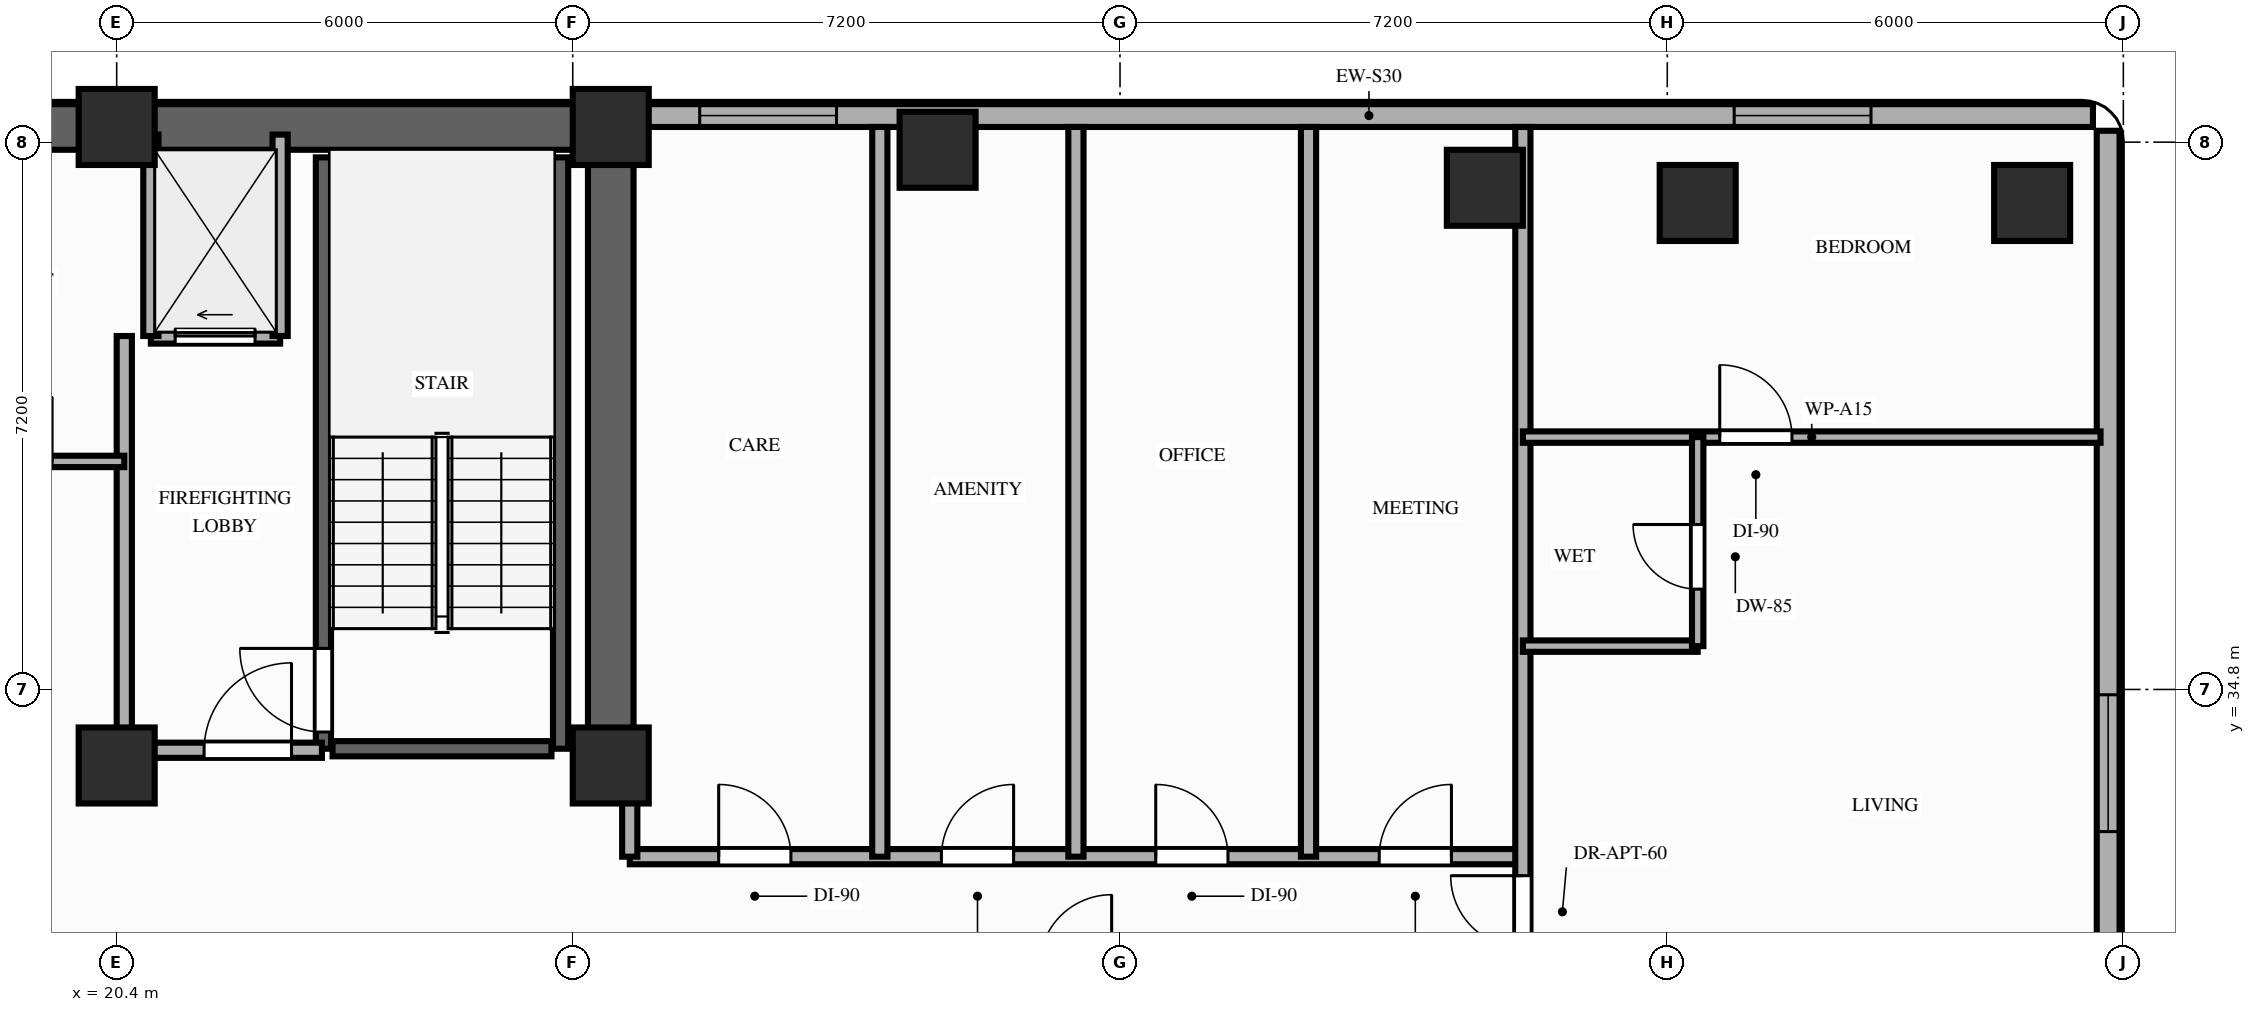
"""IFC4 building model, lengths in metres.
Left out: names, types, materials, properties, quantities, classifications, styles, units other than length and angle.
Written with IfcOpenShell. Run it as: python <this file> out.ifc"""

import sys

from ifc_helpers import new_model, si_unit, direction, frame, frame_2d, origin, origin_2d, place, context, subcontext, project, spatial, rectangle, extrude, element, fill, save


model = new_model("IFC4")
c1 = context("Model", 3, precision=1e-05, world=origin(), true_north=direction((0.0, 1.0)))
c2 = subcontext(c1, "Body", "Model", "MODEL_VIEW")
j1 = project(units=[si_unit("LENGTHUNIT", "METRE"), si_unit("PLANEANGLEUNIT", "RADIAN")], contexts=[c1])
p1 = place(None, origin())
s1 = spatial("IfcSite", under=j1, at=p1, CompositionType="ELEMENT")
p2 = place(p1, origin())
s2 = spatial("IfcBuilding", under=s1, at=p2, CompositionType="ELEMENT")
p3 = place(p2, frame((0.0, 0.0, 133.0)))
s3 = spatial("IfcBuildingStorey", under=s2, at=p3, CompositionType="ELEMENT", Elevation=133.0)
for number, where, z_axis, x_axis in (
    (1, (20.4, 33.8, 0.0), (0.0, 0.0, 1.0), (1.0, 0.0, 0.0)),
    (2, (26.9, 33.8, 0.0), (0.0, 0.0, 1.0), (1.0, 0.0, 0.0)),
    (3, (20.4, 42.2, 0.0), (0.0, 0.0, 1.0), (1.0, 0.0, 0.0)),
    (4, (26.9, 42.2, 0.0), (0.0, 0.0, 1.0), (1.0, 0.0, 0.0)),
    (5, (31.2, 41.9, 0.0), (0.0, 0.0, 1.0), (1.0, 0.0, 0.0)),
    (6, (38.4, 41.4, 0.0), (0.0, 0.0, 1.0), (1.0, 0.0, 0.0)),
    (7, (41.2, 41.2, 0.0), (0.0, 0.0, 1.0), (1.0, 0.0, 0.0)),
    (8, (45.6, 41.2, 0.0), (0.0, 0.0, 1.0), (1.0, 0.0, 0.0)),
):
    element("IfcColumn", number, at=place(p3, frame(where, z_axis=z_axis, x_axis=x_axis)), inside=s3, PredefinedType="COLUMN", context=c2, shape_type="SweptSolid", body=[
        extrude(rectangle(XDim=1.0, YDim=1.0, at=origin_2d()), origin(), (0.0, 0.0, 1.0), 3.2),
    ])
p4 = place(p3, frame((46.4, 42.35, 0.0), z_axis=(0.0, 0.0, 1.0), x_axis=(-1.0, 0.0, 0.0)))
e9 = element("IfcWall", 9, at=p4, inside=s3, PredefinedType="STANDARD", context=c2, shape_type="SweptSolid", body=[
    extrude(rectangle(XDim=19.05, YDim=0.3, at=frame_2d((9.525, 0.0))), origin(), (0.0, 0.0, 1.0), 2.46),
])
p5 = place(p4, frame((2.92, 0.0, 0.85)))
e10 = element("IfcOpeningElement", 10, at=p5, cuts=e9, PredefinedType="OPENING", context=c2, shape_type="SweptSolid", body=[
    extrude(rectangle(XDim=1.8, YDim=1.36, at=frame_2d((0.9, 0.68))), frame((0.0, 0.16, 0.0), z_axis=(0.0, -1.0, 0.0), x_axis=(1.0, 0.0, 0.0)), (0.0, 0.0, 1.0), 0.32),
])
p6 = place(p4, frame((16.53, 0.0, 0.85)))
e11 = element("IfcOpeningElement", 11, at=p6, cuts=e9, PredefinedType="OPENING", context=c2, shape_type="SweptSolid", body=[
    extrude(rectangle(XDim=1.8, YDim=1.36, at=frame_2d((0.9, 0.68))), frame((0.0, 0.16, 0.0), z_axis=(0.0, -1.0, 0.0), x_axis=(1.0, 0.0, 0.0)), (0.0, 0.0, 1.0), 0.32),
])
p7 = place(p3, frame((46.6, 26.8, 0.0), z_axis=(0.0, 0.0, 1.0), x_axis=(0.0, 1.0, 0.0)))
e12 = element("IfcWall", 12, at=p7, inside=s3, PredefinedType="STANDARD", context=c2, shape_type="SweptSolid", body=[
    extrude(rectangle(XDim=15.35, YDim=0.3, at=frame_2d((7.675, 0.0))), origin(), (0.0, 0.0, 1.0), 3.02),
])
p8 = place(p7, frame((6.13, 0.0, 0.85)))
e13 = element("IfcOpeningElement", 13, at=p8, cuts=e12, PredefinedType="OPENING", context=c2, shape_type="SweptSolid", body=[
    extrude(rectangle(XDim=1.8, YDim=1.75, at=frame_2d((0.9, 0.875))), frame((0.0, 0.16, 0.0), z_axis=(0.0, -1.0, 0.0), x_axis=(1.0, 0.0, 0.0)), (0.0, 0.0, 1.0), 0.32),
])
p9 = place(p3, frame((6.45, 42.2, 0.0), z_axis=(0.0, 0.0, 1.0), x_axis=(1.0, 0.0, 0.0)))
e14 = element("IfcWall", 14, at=p9, inside=s3, PredefinedType="SHEAR", context=c2, shape_type="SweptSolid", body=[
    extrude(rectangle(XDim=20.45, YDim=0.6, at=frame_2d((10.225, 0.0))), origin(), (0.0, 0.0, 1.0), 3.02),
])
p10 = place(p3, frame((26.9, 33.8, 0.0), z_axis=(0.0, 0.0, 1.0), x_axis=(0.0, 1.0, 0.0)))
e15 = element("IfcWall", 15, at=p10, inside=s3, PredefinedType="SHEAR", context=c2, shape_type="SweptSolid", body=[
    extrude(rectangle(XDim=7.95, YDim=0.6, at=frame_2d((3.975, 0.0))), origin(), (0.0, 0.0, 1.0), 3.02),
])
p11 = place(p3, frame((23.12, 34.02, 0.0), z_axis=(0.0, 0.0, 1.0), x_axis=(0.0, 1.0, 0.0)))
e16 = element("IfcWall", 16, at=p11, inside=s3, PredefinedType="SHEAR", context=c2, shape_type="SweptSolid", body=[
    extrude(rectangle(XDim=7.78, YDim=0.2, at=frame_2d((3.89, 0.0))), origin(), (0.0, 0.0, 1.0), 3.02),
])
p12 = place(p11, frame((0.22, 0.0, 0.0)))
e17 = element("IfcOpeningElement", 17, at=p12, cuts=e16, PredefinedType="OPENING", context=c2, shape_type="SweptSolid", body=[
    extrude(rectangle(XDim=1.1, YDim=2.15, at=frame_2d((0.55, 1.075))), frame((0.0, 0.11, 0.0), z_axis=(0.0, -1.0, 0.0), x_axis=(1.0, 0.0, 0.0)), (0.0, 0.0, 1.0), 0.22),
])
p13 = place(p3, frame((26.24, 34.02, 0.0), z_axis=(0.0, 0.0, 1.0), x_axis=(0.0, 1.0, 0.0)))
e18 = element("IfcWall", 18, at=p13, inside=s3, PredefinedType="SHEAR", context=c2, shape_type="SweptSolid", body=[
    extrude(rectangle(XDim=7.78, YDim=0.2, at=frame_2d((3.89, 0.0))), origin(), (0.0, 0.0, 1.0), 3.02),
])
p14 = place(p3, frame((23.24, 34.02, 0.0), z_axis=(0.0, 0.0, 1.0), x_axis=(1.0, 0.0, 0.0)))
e19 = element("IfcWall", 19, at=p14, inside=s3, PredefinedType="SHEAR", context=c2, shape_type="SweptSolid", body=[
    extrude(rectangle(XDim=2.88, YDim=0.2, at=frame_2d((1.44, 0.0))), origin(), (0.0, 0.0, 1.0), 3.02),
])
p15 = place(p3, frame((20.85, 39.45, 0.0), z_axis=(0.0, 0.0, 1.0), x_axis=(1.0, 0.0, 0.0)))
e20 = element("IfcWall", 20, at=p15, inside=s3, PredefinedType="MOVABLE", context=c2, shape_type="SweptSolid", body=[
    extrude(rectangle(XDim=1.7, YDim=0.2, at=frame_2d((0.85, 0.0))), origin(), (0.0, 0.0, 1.0), 3.02),
])
p16 = place(p15, frame((0.32, 0.0, 0.0)))
e21 = element("IfcOpeningElement", 21, at=p16, cuts=e20, PredefinedType="OPENING", context=c2, shape_type="SweptSolid", body=[
    extrude(rectangle(XDim=1.05, YDim=2.15, at=frame_2d((0.525, 1.075))), frame((0.0, 0.11, 0.0), z_axis=(0.0, -1.0, 0.0), x_axis=(1.0, 0.0, 0.0)), (0.0, 0.0, 1.0), 0.22),
])
for number, where, z_axis, x_axis in (
    (22, (20.85, 39.45, 0.0), (0.0, 0.0, 1.0), (0.0, 1.0, 0.0)),
    (23, (22.55, 39.45, 0.0), (0.0, 0.0, 1.0), (0.0, 1.0, 0.0)),
):
    element("IfcWall", number, at=place(p3, frame(where, z_axis=z_axis, x_axis=x_axis)), inside=s3, PredefinedType="MOVABLE", context=c2, shape_type="SweptSolid", body=[
        extrude(rectangle(XDim=2.65, YDim=0.2, at=frame_2d((1.325, 0.0))), origin(), (0.0, 0.0, 1.0), 2.46),
    ])
p17 = place(p3, frame((20.5, 34.0, 0.0), z_axis=(0.0, 0.0, 1.0), x_axis=(0.0, 1.0, 0.0)))
e24 = element("IfcWall", 24, at=p17, inside=s3, PredefinedType="PARTITIONING", context=c2, shape_type="SweptSolid", body=[
    extrude(rectangle(XDim=5.45, YDim=0.2, at=frame_2d((2.725, 0.0))), origin(), (0.0, 0.0, 1.0), 2.46),
])
p18 = place(p3, frame((20.5, 34.0, 0.0), z_axis=(0.0, 0.0, 1.0), x_axis=(1.0, 0.0, 0.0)))
e25 = element("IfcWall", 25, at=p18, inside=s3, PredefinedType="PARTITIONING", context=c2, shape_type="SweptSolid", body=[
    extrude(rectangle(XDim=2.6, YDim=0.2, at=frame_2d((1.3, 0.0))), origin(), (0.0, 0.0, 1.0), 2.46),
])
p19 = place(p18, frame((1.05, 0.0, 0.0)))
e26 = element("IfcOpeningElement", 26, at=p19, cuts=e25, PredefinedType="OPENING", context=c2, shape_type="SweptSolid", body=[
    extrude(rectangle(XDim=1.15, YDim=2.15, at=frame_2d((0.575, 1.075))), frame((0.0, 0.11, 0.0), z_axis=(0.0, -1.0, 0.0), x_axis=(1.0, 0.0, 0.0)), (0.0, 0.0, 1.0), 0.22),
])
p20 = place(p3, frame((12.9, 37.8, 0.0), z_axis=(0.0, 0.0, 1.0), x_axis=(1.0, 0.0, 0.0)))
e27 = element("IfcWall", 27, at=p20, inside=s3, PredefinedType="PARTITIONING", context=c2, shape_type="SweptSolid", body=[
    extrude(rectangle(XDim=7.6, YDim=0.15, at=frame_2d((3.8, 0.0))), origin(), (0.0, 0.0, 1.0), 3.02),
])
p21 = place(p20, frame((0.7, 0.0, 0.0)))
e28 = element("IfcOpeningElement", 28, at=p21, cuts=e27, PredefinedType="OPENING", context=c2, shape_type="SweptSolid", body=[
    extrude(rectangle(XDim=0.85, YDim=2.05, at=frame_2d((0.425, 1.025))), frame((0.0, 0.085, 0.0), z_axis=(0.0, -1.0, 0.0), x_axis=(1.0, 0.0, 0.0)), (0.0, 0.0, 1.0), 0.17),
])
p22 = place(p20, frame((3.25, 0.0, 0.0)))
e29 = element("IfcOpeningElement", 29, at=p22, cuts=e27, PredefinedType="OPENING", context=c2, shape_type="SweptSolid", body=[
    extrude(rectangle(XDim=0.85, YDim=2.05, at=frame_2d((0.425, 1.025))), frame((0.0, 0.085, 0.0), z_axis=(0.0, -1.0, 0.0), x_axis=(1.0, 0.0, 0.0)), (0.0, 0.0, 1.0), 0.17),
])
p23 = place(p20, frame((5.8, 0.0, 0.0)))
e30 = element("IfcOpeningElement", 30, at=p23, cuts=e27, PredefinedType="OPENING", context=c2, shape_type="SweptSolid", body=[
    extrude(rectangle(XDim=0.85, YDim=2.05, at=frame_2d((0.425, 1.025))), frame((0.0, 0.085, 0.0), z_axis=(0.0, -1.0, 0.0), x_axis=(1.0, 0.0, 0.0)), (0.0, 0.0, 1.0), 0.17),
])
p24 = place(p3, frame((27.15, 32.6, 0.0), z_axis=(0.0, 0.0, 1.0), x_axis=(1.0, 0.0, 0.0)))
e31 = element("IfcWall", 31, at=p24, inside=s3, PredefinedType="PARTITIONING", context=c2, shape_type="SweptSolid", body=[
    extrude(rectangle(XDim=11.75, YDim=0.2, at=frame_2d((5.875, 0.0))), origin(), (0.0, 0.0, 1.0), 2.46),
])
p25 = place(p24, frame((1.17, 0.0, 0.0)))
e32 = element("IfcOpeningElement", 32, at=p25, cuts=e31, PredefinedType="OPENING", context=c2, shape_type="SweptSolid", body=[
    extrude(rectangle(XDim=0.95, YDim=2.15, at=frame_2d((0.475, 1.075))), frame((0.0, 0.11, 0.0), z_axis=(0.0, -1.0, 0.0), x_axis=(1.0, 0.0, 0.0)), (0.0, 0.0, 1.0), 0.22),
])
p26 = place(p24, frame((4.1, 0.0, 0.0)))
e33 = element("IfcOpeningElement", 33, at=p26, cuts=e31, PredefinedType="OPENING", context=c2, shape_type="SweptSolid", body=[
    extrude(rectangle(XDim=0.95, YDim=2.15, at=frame_2d((0.475, 1.075))), frame((0.0, 0.11, 0.0), z_axis=(0.0, -1.0, 0.0), x_axis=(1.0, 0.0, 0.0)), (0.0, 0.0, 1.0), 0.22),
])
p27 = place(p24, frame((6.92, 0.0, 0.0)))
e34 = element("IfcOpeningElement", 34, at=p27, cuts=e31, PredefinedType="OPENING", context=c2, shape_type="SweptSolid", body=[
    extrude(rectangle(XDim=0.95, YDim=2.15, at=frame_2d((0.475, 1.075))), frame((0.0, 0.11, 0.0), z_axis=(0.0, -1.0, 0.0), x_axis=(1.0, 0.0, 0.0)), (0.0, 0.0, 1.0), 0.22),
])
p28 = place(p24, frame((9.86, 0.0, 0.0)))
e35 = element("IfcOpeningElement", 35, at=p28, cuts=e31, PredefinedType="OPENING", context=c2, shape_type="SweptSolid", body=[
    extrude(rectangle(XDim=0.95, YDim=2.15, at=frame_2d((0.475, 1.075))), frame((0.0, 0.11, 0.0), z_axis=(0.0, -1.0, 0.0), x_axis=(1.0, 0.0, 0.0)), (0.0, 0.0, 1.0), 0.22),
])
p29 = place(p3, frame((27.15, 32.6, 0.0), z_axis=(0.0, 0.0, 1.0), x_axis=(0.0, 1.0, 0.0)))
e36 = element("IfcWall", 36, at=p29, inside=s3, PredefinedType="PARTITIONING", context=c2, shape_type="SweptSolid", body=[
    extrude(rectangle(XDim=1.08, YDim=0.2, at=frame_2d((0.54, 0.0))), origin(), (0.0, 0.0, 1.0), 2.46),
])
p30 = place(p3, frame((38.9, 26.75, 0.0), z_axis=(0.0, 0.0, 1.0), x_axis=(0.0, 1.0, 0.0)))
e37 = element("IfcWall", 37, at=p30, inside=s3, PredefinedType="PARTITIONING", context=c2, shape_type="SweptSolid", body=[
    extrude(rectangle(XDim=15.45, YDim=0.2, at=frame_2d((7.725, 0.0))), origin(), (0.0, 0.0, 1.0), 2.46),
])
p31 = place(p30, frame((4.65, 0.0, 0.0)))
e38 = element("IfcOpeningElement", 38, at=p31, cuts=e37, PredefinedType="OPENING", context=c2, shape_type="SweptSolid", body=[
    extrude(rectangle(XDim=0.95, YDim=2.15, at=frame_2d((0.475, 1.075))), frame((0.0, 0.11, 0.0), z_axis=(0.0, -1.0, 0.0), x_axis=(1.0, 0.0, 0.0)), (0.0, 0.0, 1.0), 0.22),
])
p32 = place(p3, frame((38.9, 38.12, 0.0), z_axis=(0.0, 0.0, 1.0), x_axis=(1.0, 0.0, 0.0)))
e39 = element("IfcWall", 39, at=p32, inside=s3, PredefinedType="PARTITIONING", context=c2, shape_type="SweptSolid", body=[
    extrude(rectangle(XDim=7.6, YDim=0.15, at=frame_2d((3.8, 0.0))), origin(), (0.0, 0.0, 1.0), 2.46),
])
p33 = place(p32, frame((2.59, 0.0, 0.0)))
e40 = element("IfcOpeningElement", 40, at=p33, cuts=e39, PredefinedType="OPENING", context=c2, shape_type="SweptSolid", body=[
    extrude(rectangle(XDim=0.95, YDim=2.15, at=frame_2d((0.475, 1.075))), frame((0.0, 0.085, 0.0), z_axis=(0.0, -1.0, 0.0), x_axis=(1.0, 0.0, 0.0)), (0.0, 0.0, 1.0), 0.17),
])
p34 = place(p3, frame((38.9, 35.37, 0.0), z_axis=(0.0, 0.0, 1.0), x_axis=(1.0, 0.0, 0.0)))
e41 = element("IfcWall", 41, at=p34, inside=s3, PredefinedType="PARTITIONING", context=c2, shape_type="SweptSolid", body=[
    extrude(rectangle(XDim=2.3, YDim=0.15, at=frame_2d((1.15, 0.0))), origin(), (0.0, 0.0, 1.0), 2.46),
])
p35 = place(p3, frame((41.2, 35.37, 0.0), z_axis=(0.0, 0.0, 1.0), x_axis=(0.0, 1.0, 0.0)))
e42 = element("IfcWall", 42, at=p35, inside=s3, PredefinedType="PARTITIONING", context=c2, shape_type="SweptSolid", body=[
    extrude(rectangle(XDim=2.75, YDim=0.15, at=frame_2d((1.375, 0.0))), origin(), (0.0, 0.0, 1.0), 2.46),
])
p36 = place(p35, frame((0.75, 0.0, 0.0)))
e43 = element("IfcOpeningElement", 43, at=p36, cuts=e42, PredefinedType="OPENING", context=c2, shape_type="SweptSolid", body=[
    extrude(rectangle(XDim=0.85, YDim=2.1, at=frame_2d((0.425, 1.05))), frame((0.0, 0.085, 0.0), z_axis=(0.0, -1.0, 0.0), x_axis=(1.0, 0.0, 0.0)), (0.0, 0.0, 1.0), 0.17),
])
for number, where, z_axis, x_axis in (
    (44, (30.44, 32.6, 0.0), (0.0, 0.0, 1.0), (0.0, 1.0, 0.0)),
    (45, (33.02, 32.6, 0.0), (0.0, 0.0, 1.0), (0.0, 1.0, 0.0)),
    (46, (36.08, 32.6, 0.0), (0.0, 0.0, 1.0), (0.0, 1.0, 0.0)),
):
    element("IfcWall", number, at=place(p3, frame(where, z_axis=z_axis, x_axis=x_axis)), inside=s3, PredefinedType="PARTITIONING", context=c2, shape_type="SweptSolid", body=[
        extrude(rectangle(XDim=9.6, YDim=0.2, at=frame_2d((4.8, 0.0))), origin(), (0.0, 0.0, 1.0), 2.46),
    ])
p37 = place(p8, origin())
e47 = element("IfcWindow", 47, at=p37, inside=s3, PartitioningType="SINGLE_PANEL", PredefinedType="WINDOW", context=c2, shape_type="SweptSolid", body=[
    extrude(rectangle(XDim=1.8, YDim=1.75, at=frame_2d((0.9, 0.875))), frame((0.0, 0.03, 0.0), z_axis=(0.0, -1.0, 0.0), x_axis=(1.0, 0.0, 0.0)), (0.0, 0.0, 1.0), 0.06),
])
fill(e13, e47)
p38 = place(p5, origin())
e48 = element("IfcWindow", 48, at=p38, inside=s3, PartitioningType="SINGLE_PANEL", PredefinedType="WINDOW", context=c2, shape_type="SweptSolid", body=[
    extrude(rectangle(XDim=1.8, YDim=1.36, at=frame_2d((0.9, 0.68))), frame((0.0, 0.03, 0.0), z_axis=(0.0, -1.0, 0.0), x_axis=(1.0, 0.0, 0.0)), (0.0, 0.0, 1.0), 0.06),
])
fill(e10, e48)
p39 = place(p6, origin())
e49 = element("IfcWindow", 49, at=p39, inside=s3, PartitioningType="SINGLE_PANEL", PredefinedType="WINDOW", context=c2, shape_type="SweptSolid", body=[
    extrude(rectangle(XDim=1.8, YDim=1.36, at=frame_2d((0.9, 0.68))), frame((0.0, 0.03, 0.0), z_axis=(0.0, -1.0, 0.0), x_axis=(1.0, 0.0, 0.0)), (0.0, 0.0, 1.0), 0.06),
])
fill(e11, e49)
p40 = place(p12, origin())
e50 = element("IfcDoor", 50, at=p40, inside=s3, OperationType="SINGLE_SWING_RIGHT", PredefinedType="DOOR", context=c2, shape_type="SweptSolid", body=[
    extrude(rectangle(XDim=1.1, YDim=2.15, at=frame_2d((0.55, 1.075))), frame((0.0, 0.025, 0.0), z_axis=(0.0, -1.0, 0.0), x_axis=(1.0, 0.0, 0.0)), (0.0, 0.0, 1.0), 0.05),
])
fill(e17, e50)
p41 = place(p16, origin())
e51 = element("IfcDoor", 51, at=p41, inside=s3, OperationType="SLIDING_TO_LEFT", PredefinedType="DOOR", context=c2, shape_type="SweptSolid", body=[
    extrude(rectangle(XDim=1.05, YDim=2.15, at=frame_2d((0.525, 1.075))), frame((0.0, 0.025, 0.0), z_axis=(0.0, -1.0, 0.0), x_axis=(1.0, 0.0, 0.0)), (0.0, 0.0, 1.0), 0.05),
])
fill(e21, e51)
p42 = place(p19, origin())
e52 = element("IfcDoor", 52, at=p42, inside=s3, OperationType="SINGLE_SWING_RIGHT", PredefinedType="DOOR", context=c2, shape_type="SweptSolid", body=[
    extrude(rectangle(XDim=1.15, YDim=2.15, at=frame_2d((0.575, 1.075))), frame((0.0, 0.025, 0.0), z_axis=(0.0, -1.0, 0.0), x_axis=(1.0, 0.0, 0.0)), (0.0, 0.0, 1.0), 0.05),
])
fill(e26, e52)
p43 = place(p31, origin())
e53 = element("IfcDoor", 53, at=p43, inside=s3, OperationType="SINGLE_SWING_RIGHT", PredefinedType="DOOR", context=c2, shape_type="SweptSolid", body=[
    extrude(rectangle(XDim=0.95, YDim=2.15, at=frame_2d((0.475, 1.075))), frame((0.0, 0.025, 0.0), z_axis=(0.0, -1.0, 0.0), x_axis=(1.0, 0.0, 0.0)), (0.0, 0.0, 1.0), 0.05),
])
fill(e38, e53)
p44 = place(p33, origin())
e54 = element("IfcDoor", 54, at=p44, inside=s3, OperationType="SINGLE_SWING_LEFT", PredefinedType="DOOR", context=c2, shape_type="SweptSolid", body=[
    extrude(rectangle(XDim=0.95, YDim=2.15, at=frame_2d((0.475, 1.075))), frame((0.0, 0.025, 0.0), z_axis=(0.0, -1.0, 0.0), x_axis=(1.0, 0.0, 0.0)), (0.0, 0.0, 1.0), 0.05),
])
fill(e40, e54)
p45 = place(p36, origin())
e55 = element("IfcDoor", 55, at=p45, inside=s3, OperationType="SINGLE_SWING_RIGHT", PredefinedType="DOOR", context=c2, shape_type="SweptSolid", body=[
    extrude(rectangle(XDim=0.85, YDim=2.1, at=frame_2d((0.425, 1.05))), frame((0.0, 0.025, 0.0), z_axis=(0.0, -1.0, 0.0), x_axis=(1.0, 0.0, 0.0)), (0.0, 0.0, 1.0), 0.05),
])
fill(e43, e55)
p46 = place(p25, origin())
e56 = element("IfcDoor", 56, at=p46, inside=s3, OperationType="SINGLE_SWING_LEFT", PredefinedType="DOOR", context=c2, shape_type="SweptSolid", body=[
    extrude(rectangle(XDim=0.95, YDim=2.15, at=frame_2d((0.475, 1.075))), frame((0.0, 0.025, 0.0), z_axis=(0.0, -1.0, 0.0), x_axis=(1.0, 0.0, 0.0)), (0.0, 0.0, 1.0), 0.05),
])
fill(e32, e56)
p47 = place(p26, origin())
e57 = element("IfcDoor", 57, at=p47, inside=s3, OperationType="SINGLE_SWING_RIGHT", PredefinedType="DOOR", context=c2, shape_type="SweptSolid", body=[
    extrude(rectangle(XDim=0.95, YDim=2.15, at=frame_2d((0.475, 1.075))), frame((0.0, 0.025, 0.0), z_axis=(0.0, -1.0, 0.0), x_axis=(1.0, 0.0, 0.0)), (0.0, 0.0, 1.0), 0.05),
])
fill(e33, e57)
p48 = place(p27, origin())
e58 = element("IfcDoor", 58, at=p48, inside=s3, OperationType="SINGLE_SWING_LEFT", PredefinedType="DOOR", context=c2, shape_type="SweptSolid", body=[
    extrude(rectangle(XDim=0.95, YDim=2.15, at=frame_2d((0.475, 1.075))), frame((0.0, 0.025, 0.0), z_axis=(0.0, -1.0, 0.0), x_axis=(1.0, 0.0, 0.0)), (0.0, 0.0, 1.0), 0.05),
])
fill(e34, e58)
p49 = place(p28, origin())
e59 = element("IfcDoor", 59, at=p49, inside=s3, OperationType="SINGLE_SWING_RIGHT", PredefinedType="DOOR", context=c2, shape_type="SweptSolid", body=[
    extrude(rectangle(XDim=0.95, YDim=2.15, at=frame_2d((0.475, 1.075))), frame((0.0, 0.025, 0.0), z_axis=(0.0, -1.0, 0.0), x_axis=(1.0, 0.0, 0.0)), (0.0, 0.0, 1.0), 0.05),
])
fill(e35, e59)
save(model, sys.argv[1])
